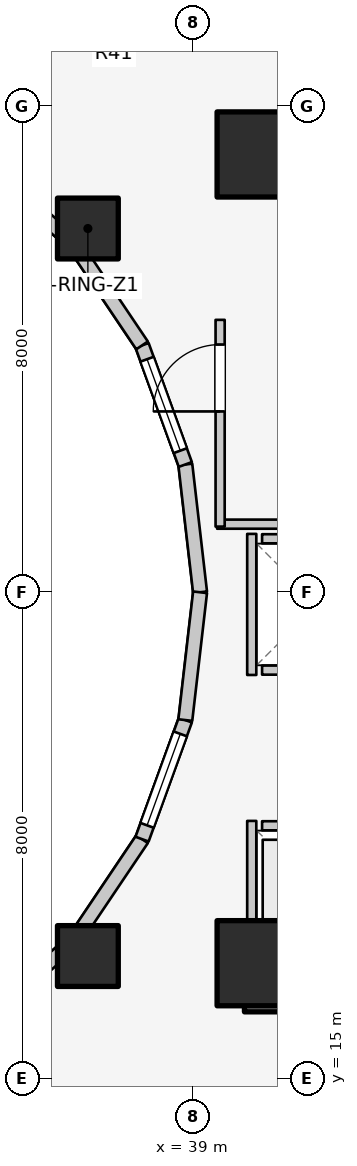
"""IFC4 building model, lengths in metres.
Left out: names, types, materials, properties, quantities, classifications, styles, units other than length and angle.
Written with IfcOpenShell. Run it as: python <this file> out.ifc"""

import sys

from ifc_helpers import new_model, si_unit, direction, frame, frame_2d, origin, origin_2d, place, context, subcontext, project, spatial, rectangle, extrude, element, fill, save


model = new_model("IFC4")
c1 = context("Model", 3, precision=1e-05, world=origin(), true_north=direction((0.0, 1.0)))
c2 = subcontext(c1, "Body", "Model", "MODEL_VIEW")
j1 = project(units=[si_unit("LENGTHUNIT", "METRE"), si_unit("PLANEANGLEUNIT", "RADIAN")], contexts=[c1])
p1 = place(None, origin())
s1 = spatial("IfcSite", under=j1, at=p1, CompositionType="ELEMENT")
p2 = place(p1, origin())
s2 = spatial("IfcBuilding", under=s1, at=p2, CompositionType="ELEMENT")
p3 = place(p2, frame((0.0, 0.0, 40.0)))
s3 = spatial("IfcBuildingStorey", under=s2, at=p3, CompositionType="ELEMENT", Elevation=40.0)
for number, where, z_axis, x_axis in (
    (1, (39.85, 16.55, 0.0), (0.0, 0.0, 1.0), (1.0, 0.0, 0.0)),
    (2, (39.85, 30.35, 0.0), (0.0, 0.0, 1.0), (1.0, 0.0, 0.0)),
):
    element("IfcWall", number, at=place(p3, frame(where, z_axis=z_axis, x_axis=x_axis)), inside=s3, PredefinedType="SHEAR", context=c2, shape_type="SweptSolid", body=[
        extrude(rectangle(XDim=4.5, YDim=0.9, at=frame_2d((2.25, 0.0))), origin(), (0.0, 0.0, 1.0), 3.1),
    ])
for number, where, z_axis, x_axis in (
    (3, (40.1, 16.9, 0.0), (0.0, 0.0, 1.0), (1.0, 0.0, 0.0)),
    (4, (40.1, 30.2, 0.0), (0.0, 0.0, 1.0), (1.0, 0.0, 0.0)),
):
    element("IfcColumn", number, at=place(p3, frame(where, z_axis=z_axis, x_axis=x_axis)), inside=s3, PredefinedType="COLUMN", context=c2, shape_type="SweptSolid", body=[
        extrude(rectangle(XDim=1.4, YDim=1.4, at=origin_2d()), origin(), (0.0, 0.0, 1.0), 3.1),
    ])
for number, where, z_axis, x_axis in (
    (5, (37.275, 28.982, 0.0), (0.0, 0.0, 1.0), (1.0, 0.0, 0.0)),
    (6, (37.275, 17.018, 0.0), (0.0, 0.0, 1.0), (1.0, 0.0, 0.0)),
):
    element("IfcColumn", number, at=place(p3, frame(where, z_axis=z_axis, x_axis=x_axis)), inside=s3, PredefinedType="COLUMN", context=c2, shape_type="SweptSolid", body=[
        extrude(rectangle(XDim=1.0, YDim=1.0, at=origin_2d()), origin(), (0.0, 0.0, 1.0), 3.1),
    ])
p4 = place(p3, frame((39.12, 23.0, 0.0), z_axis=(0.0, 0.0, 1.0), x_axis=(-0.114711713601, 0.993398823617, 0.0)))
e7 = element("IfcWall", 7, at=p4, inside=s3, PredefinedType="STANDARD", context=c2, shape_type="SweptSolid", body=[
    extrude(rectangle(XDim=2.115, YDim=0.23, at=frame_2d((1.058, 0.0))), origin(), (0.0, 0.0, 1.0), 2.84),
])
p5 = place(p3, frame((38.877, 25.102, 0.0), z_axis=(0.0, 0.0, 1.0), x_axis=(-0.341423187295, 0.93990968033, 0.0)))
e8 = element("IfcWall", 8, at=p5, inside=s3, PredefinedType="STANDARD", context=c2, shape_type="SweptSolid", body=[
    extrude(rectangle(XDim=2.084, YDim=0.23, at=frame_2d((1.042, 0.0))), origin(), (0.0, 0.0, 1.0), 2.84),
])
p6 = place(p5, frame((0.242, 0.0, 0.85)))
e9 = element("IfcOpeningElement", 9, at=p6, cuts=e8, PredefinedType="OPENING", context=c2, shape_type="SweptSolid", body=[
    extrude(rectangle(XDim=1.6, YDim=1.65, at=frame_2d((0.8, 0.825))), frame((0.0, 0.125, 0.0), z_axis=(0.0, -1.0, 0.0), x_axis=(1.0, 0.0, 0.0)), (0.0, 0.0, 1.0), 0.25),
])
p7 = place(p3, frame((38.166, 27.06, 0.0), z_axis=(0.0, 0.0, 1.0), x_axis=(-0.558197800898, 0.829707909492, 0.0)))
e10 = element("IfcWall", 10, at=p7, inside=s3, PredefinedType="STANDARD", context=c2, shape_type="SweptSolid", body=[
    extrude(rectangle(XDim=2.027, YDim=0.23, at=frame_2d((1.013, 0.0))), origin(), (0.0, 0.0, 1.0), 2.16),
])
for number, where, z_axis, x_axis in (
    (11, (37.035, 28.742, 0.0), (0.0, 0.0, 1.0), (-0.753, 0.659, 0.0)),
    (12, (35.56, 15.968, 0.0), (0.0, 0.0, 1.0), (0.753, 0.659, 0.0)),
):
    element("IfcWall", number, at=place(p3, frame(where, z_axis=z_axis, x_axis=x_axis)), inside=s3, PredefinedType="STANDARD", context=c2, shape_type="SweptSolid", body=[
        extrude(rectangle(XDim=1.959, YDim=0.23, at=frame_2d((0.98, 0.0))), origin(), (0.0, 0.0, 1.0), 2.16),
    ])
p8 = place(p3, frame((37.035, 17.258, 0.0), z_axis=(0.0, 0.0, 1.0), x_axis=(0.558197800898, 0.829707909492, 0.0)))
e13 = element("IfcWall", 13, at=p8, inside=s3, PredefinedType="STANDARD", context=c2, shape_type="SweptSolid", body=[
    extrude(rectangle(XDim=2.027, YDim=0.23, at=frame_2d((1.013, 0.0))), origin(), (0.0, 0.0, 1.0), 2.16),
])
p9 = place(p3, frame((38.166, 18.94, 0.0), z_axis=(0.0, 0.0, 1.0), x_axis=(0.341423187295, 0.93990968033, 0.0)))
e14 = element("IfcWall", 14, at=p9, inside=s3, PredefinedType="STANDARD", context=c2, shape_type="SweptSolid", body=[
    extrude(rectangle(XDim=2.084, YDim=0.23, at=frame_2d((1.042, 0.0))), origin(), (0.0, 0.0, 1.0), 2.84),
])
p10 = place(p9, frame((0.242, 0.0, 0.85)))
e15 = element("IfcOpeningElement", 15, at=p10, cuts=e14, PredefinedType="OPENING", context=c2, shape_type="SweptSolid", body=[
    extrude(rectangle(XDim=1.6, YDim=1.65, at=frame_2d((0.8, 0.825))), frame((0.0, 0.125, 0.0), z_axis=(0.0, -1.0, 0.0), x_axis=(1.0, 0.0, 0.0)), (0.0, 0.0, 1.0), 0.25),
])
p11 = place(p3, frame((38.877, 20.898, 0.0), z_axis=(0.0, 0.0, 1.0), x_axis=(0.114711713601, 0.993398823617, 0.0)))
e16 = element("IfcWall", 16, at=p11, inside=s3, PredefinedType="STANDARD", context=c2, shape_type="SweptSolid", body=[
    extrude(rectangle(XDim=2.115, YDim=0.23, at=frame_2d((1.058, 0.0))), origin(), (0.0, 0.0, 1.0), 2.84),
])
p12 = place(p3, frame((40.14, 19.16, 0.0), z_axis=(0.0, 0.0, 1.0), x_axis=(1.0, 0.0, 0.0)))
e17 = element("IfcWall", 17, at=p12, inside=s3, PredefinedType="SOLIDWALL", context=c2, shape_type="SweptSolid", body=[
    extrude(rectangle(XDim=1.82, YDim=0.15, at=frame_2d((0.91, 0.0))), origin(), (0.0, 0.0, 1.0), 2.12),
])
p13 = place(p12, frame((0.36, 0.0, 0.0)))
e18 = element("IfcOpeningElement", 18, at=p13, cuts=e17, PredefinedType="OPENING", context=c2, shape_type="SweptSolid", body=[
    extrude(rectangle(XDim=1.1, YDim=2.1, at=frame_2d((0.55, 1.05))), frame((0.0, 0.085, 0.0), z_axis=(0.0, -1.0, 0.0), x_axis=(1.0, 0.0, 0.0)), (0.0, 0.0, 1.0), 0.17),
])
p14 = place(p3, frame((40.14, 17.1, 0.0), z_axis=(0.0, 0.0, 1.0), x_axis=(1.0, 0.0, 0.0)))
e19 = element("IfcWall", 19, at=p14, inside=s3, PredefinedType="SOLIDWALL", context=c2, shape_type="SweptSolid", body=[
    extrude(rectangle(XDim=1.82, YDim=0.15, at=frame_2d((0.91, 0.0))), origin(), (0.0, 0.0, 1.0), 2.12),
])
p15 = place(p3, frame((39.97, 17.02, 0.0), z_axis=(0.0, 0.0, 1.0), x_axis=(0.0, 1.0, 0.0)))
e20 = element("IfcWall", 20, at=p15, inside=s3, PredefinedType="SOLIDWALL", context=c2, shape_type="SweptSolid", body=[
    extrude(rectangle(XDim=2.22, YDim=0.15, at=frame_2d((1.11, 0.0))), origin(), (0.0, 0.0, 1.0), 2.12),
])
for number, where, z_axis, x_axis in (
    (21, (40.14, 21.72, 0.0), (0.0, 0.0, 1.0), (1.0, 0.0, 0.0)),
    (22, (40.14, 23.88, 0.0), (0.0, 0.0, 1.0), (1.0, 0.0, 0.0)),
):
    element("IfcWall", number, at=place(p3, frame(where, z_axis=z_axis, x_axis=x_axis)), inside=s3, PredefinedType="SOLIDWALL", context=c2, shape_type="SweptSolid", body=[
        extrude(rectangle(XDim=1.82, YDim=0.15, at=frame_2d((0.91, 0.0))), origin(), (0.0, 0.0, 1.0), 2.12),
    ])
p16 = place(p3, frame((39.97, 21.64, 0.0), z_axis=(0.0, 0.0, 1.0), x_axis=(0.0, 1.0, 0.0)))
e23 = element("IfcWall", 23, at=p16, inside=s3, PredefinedType="SOLIDWALL", context=c2, shape_type="SweptSolid", body=[
    extrude(rectangle(XDim=2.32, YDim=0.15, at=frame_2d((1.16, 0.0))), origin(), (0.0, 0.0, 1.0), 2.12),
])
p17 = place(p3, frame((39.4, 24.12, 0.0), z_axis=(0.0, 0.0, 1.0), x_axis=(1.0, 0.0, 0.0)))
e24 = element("IfcWall", 24, at=p17, inside=s3, PredefinedType="PARTITIONING", context=c2, shape_type="SweptSolid", body=[
    extrude(rectangle(XDim=5.08, YDim=0.15, at=frame_2d((2.54, 0.0))), origin(), (0.0, 0.0, 1.0), 2.12),
])
p18 = place(p3, frame((39.45, 24.08, 0.0), z_axis=(0.0, 0.0, 1.0), x_axis=(0.0, 1.0, 0.0)))
e25 = element("IfcWall", 25, at=p18, inside=s3, PredefinedType="PARTITIONING", context=c2, shape_type="SweptSolid", body=[
    extrude(rectangle(XDim=3.4, YDim=0.15, at=frame_2d((1.7, 0.0))), origin(), (0.0, 0.0, 1.0), 2.855),
])
p19 = place(p18, frame((1.894, 0.0, 0.0)))
e26 = element("IfcOpeningElement", 26, at=p19, cuts=e25, PredefinedType="OPENING", context=c2, shape_type="SweptSolid", body=[
    extrude(rectangle(XDim=1.1, YDim=2.1, at=frame_2d((0.55, 1.05))), frame((0.0, 0.085, 0.0), z_axis=(0.0, -1.0, 0.0), x_axis=(1.0, 0.0, 0.0)), (0.0, 0.0, 1.0), 0.17),
])
p20 = place(p6, origin())
e27 = element("IfcWindow", 27, at=p20, inside=s3, PartitioningType="SINGLE_PANEL", PredefinedType="WINDOW", context=c2, shape_type="SweptSolid", body=[
    extrude(rectangle(XDim=1.6, YDim=1.65, at=frame_2d((0.8, 0.825))), frame((0.0, 0.03, 0.0), z_axis=(0.0, -1.0, 0.0), x_axis=(1.0, 0.0, 0.0)), (0.0, 0.0, 1.0), 0.06),
])
fill(e9, e27)
p21 = place(p10, origin())
e28 = element("IfcWindow", 28, at=p21, inside=s3, PartitioningType="SINGLE_PANEL", PredefinedType="WINDOW", context=c2, shape_type="SweptSolid", body=[
    extrude(rectangle(XDim=1.6, YDim=1.65, at=frame_2d((0.8, 0.825))), frame((0.0, 0.03, 0.0), z_axis=(0.0, -1.0, 0.0), x_axis=(1.0, 0.0, 0.0)), (0.0, 0.0, 1.0), 0.06),
])
fill(e15, e28)
p22 = place(p19, origin())
e29 = element("IfcDoor", 29, at=p22, inside=s3, OperationType="SINGLE_SWING_LEFT", PredefinedType="DOOR", context=c2, shape_type="SweptSolid", body=[
    extrude(rectangle(XDim=1.1, YDim=2.1, at=frame_2d((0.55, 1.05))), frame((0.0, 0.025, 0.0), z_axis=(0.0, -1.0, 0.0), x_axis=(1.0, 0.0, 0.0)), (0.0, 0.0, 1.0), 0.05),
])
fill(e26, e29)
save(model, sys.argv[1])
